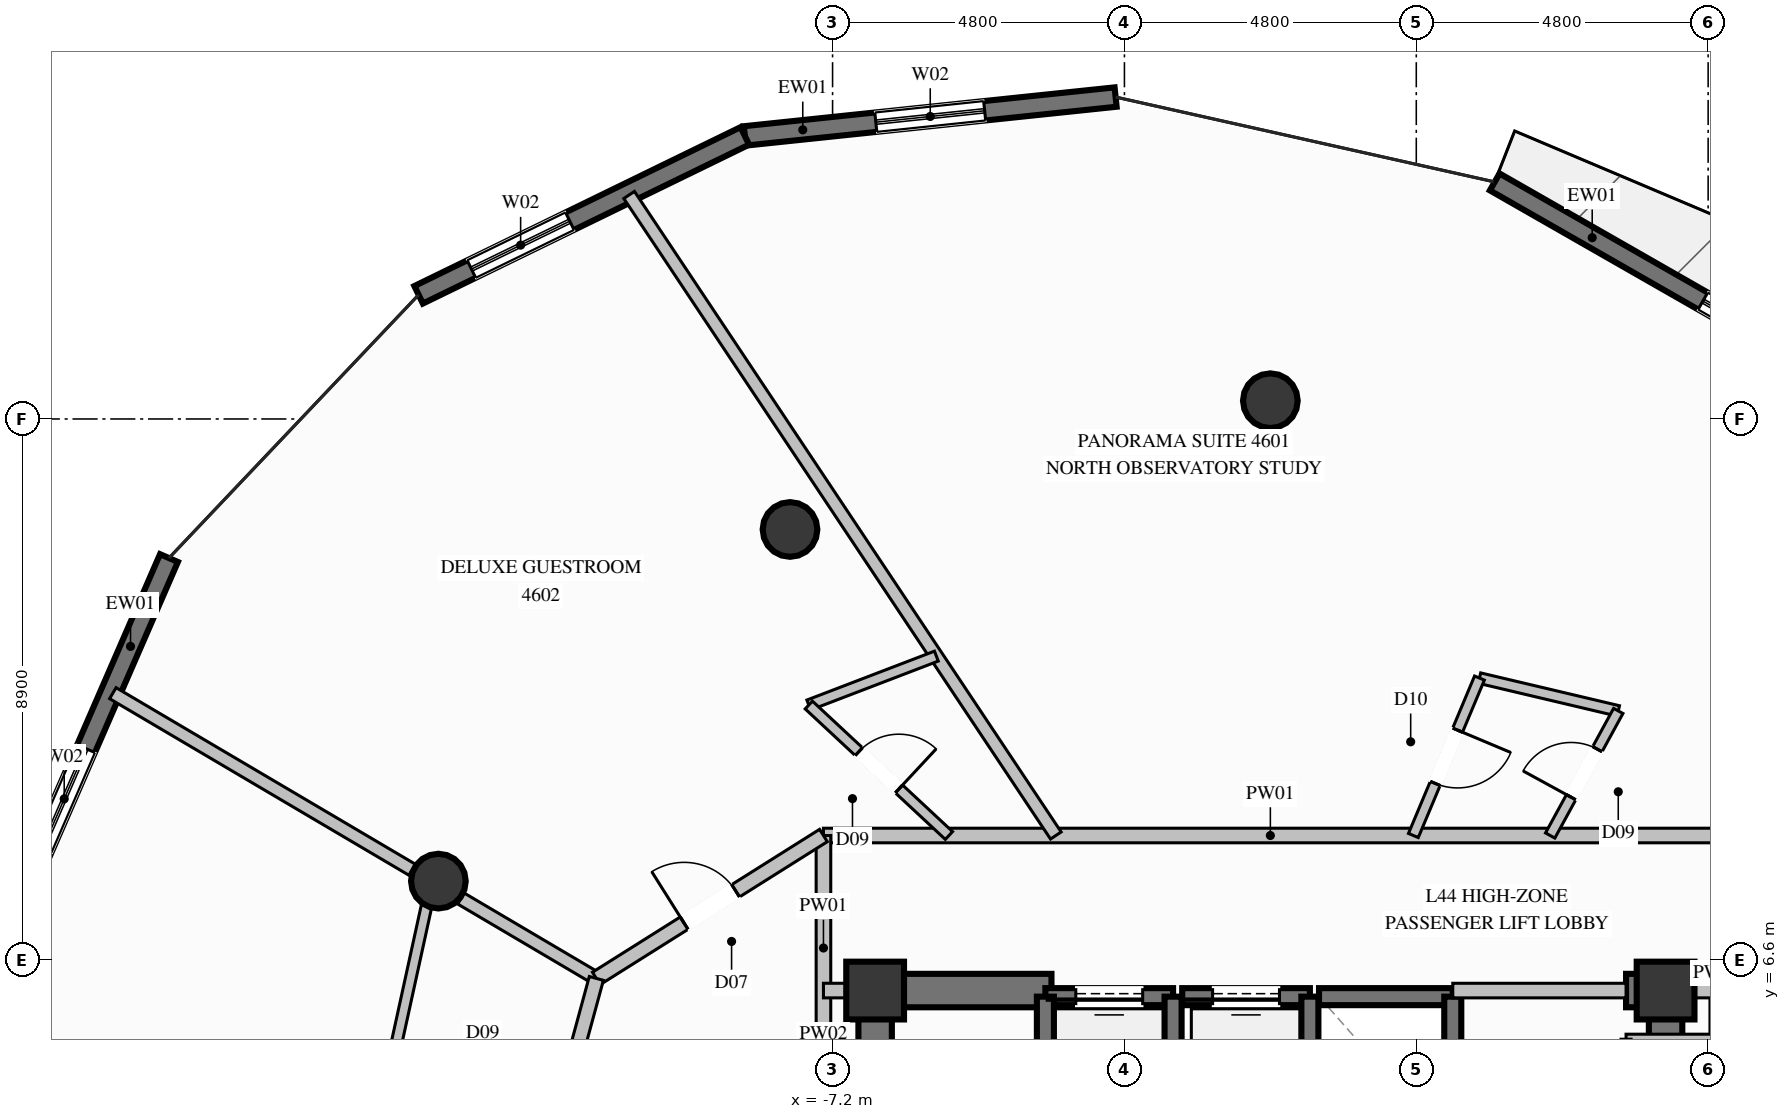
"""IFC4 building model, lengths in metres.
Left out: names, types, materials, properties, quantities, classifications, styles, units other than length and angle.
Written with IfcOpenShell. Run it as: python <this file> out.ifc"""

import sys

from ifc_helpers import new_model, si_unit, direction, frame, frame_2d, origin, origin_2d, place, context, subcontext, project, spatial, rectangle, circle, extrude, element, fill, save


model = new_model("IFC4")
c1 = context("Model", 3, precision=1e-05, world=origin(), true_north=direction((0.0, 1.0)))
c2 = subcontext(c1, "Body", "Model", "MODEL_VIEW")
j1 = project(units=[si_unit("LENGTHUNIT", "METRE"), si_unit("PLANEANGLEUNIT", "RADIAN")], contexts=[c1])
p1 = place(None, origin())
s1 = spatial("IfcSite", under=j1, at=p1, CompositionType="ELEMENT")
p2 = place(p1, origin())
s2 = spatial("IfcBuilding", under=s1, at=p2, CompositionType="ELEMENT")
p3 = place(p2, frame((0.0, 0.0, 173.2)))
s3 = spatial("IfcBuildingStorey", under=s2, at=p3, CompositionType="ELEMENT", Elevation=173.2)
for number, where, z_axis, x_axis in (
    (1, (6.5, 6.1, 0.0), (0.0, 0.0, 1.0), (1.0, 0.0, 0.0)),
    (2, (-6.5, 6.1, 0.0), (0.0, 0.0, 1.0), (1.0, 0.0, 0.0)),
):
    element("IfcColumn", number, at=place(p3, frame(where, z_axis=z_axis, x_axis=x_axis)), inside=s3, PredefinedType="COLUMN", context=c2, shape_type="SweptSolid", body=[
        extrude(rectangle(XDim=0.95, YDim=0.95, at=origin_2d()), origin(), (0.0, 0.0, 1.0), 3.6),
    ])
p4 = place(p3, frame((-6.225, 6.1, 0.0), z_axis=(0.0, 0.0, 1.0), x_axis=(1.0, 0.0, 0.0)))
e3 = element("IfcWall", 3, at=p4, inside=s3, PredefinedType="SHEAR", context=c2, shape_type="SweptSolid", body=[
    extrude(rectangle(XDim=2.625, YDim=0.55, at=frame_2d((1.312, 0.0))), origin(), (0.0, 0.0, 1.0), 3.6),
])
p5 = place(p3, frame((5.85, 6.1, 0.0), z_axis=(0.0, 0.0, 1.0), x_axis=(1.0, 0.0, 0.0)))
e4 = element("IfcWall", 4, at=p5, inside=s3, PredefinedType="SHEAR", context=c2, shape_type="SweptSolid", body=[
    extrude(rectangle(XDim=0.375, YDim=0.55, at=frame_2d((0.188, 0.0))), origin(), (0.0, 0.0, 1.0), 3.6),
])
p6 = place(p3, frame((-6.5, 2.35, 0.0), z_axis=(0.0, 0.0, 1.0), x_axis=(0.0, 1.0, 0.0)))
e5 = element("IfcWall", 5, at=p6, inside=s3, PredefinedType="SHEAR", context=c2, shape_type="SweptSolid", body=[
    extrude(rectangle(XDim=4.025, YDim=0.55, at=frame_2d((2.012, 0.0))), origin(), (0.0, 0.0, 1.0), 3.6),
])
p7 = place(p3, frame((6.5, 3.35, 0.0), z_axis=(0.0, 0.0, 1.0), x_axis=(0.0, 1.0, 0.0)))
e6 = element("IfcWall", 6, at=p7, inside=s3, PredefinedType="SHEAR", context=c2, shape_type="SweptSolid", body=[
    extrude(rectangle(XDim=3.025, YDim=0.55, at=frame_2d((1.512, 0.0))), origin(), (0.0, 0.0, 1.0), 3.6),
])
for number, where, z_axis, x_axis in (
    (7, (0.0, 15.8, 0.0), (0.0, 0.0, 1.0), (1.0, 0.0, 0.0)),
    (8, (-7.9, 13.683, 0.0), (0.0, 0.0, 1.0), (1.0, 0.0, 0.0)),
    (9, (-13.683, 7.9, 0.0), (0.0, 0.0, 1.0), (1.0, 0.0, 0.0)),
):
    element("IfcColumn", number, at=place(p3, frame(where, z_axis=z_axis, x_axis=x_axis)), inside=s3, PredefinedType="COLUMN", context=c2, shape_type="SweptSolid", body=[
        extrude(circle(Radius=0.45, at=origin_2d()), origin(), (0.0, 0.0, 1.0), 3.6),
    ])
p8 = place(p3, frame((3.69, 19.398, 0.0), z_axis=(0.0, 0.0, 1.0), x_axis=(0.868052920032, -0.496471678974, 0.0)))
e10 = element("IfcWall", 10, at=p8, inside=s3, PredefinedType="SOLIDWALL", context=c2, shape_type="SweptSolid", body=[
    extrude(rectangle(XDim=6.637, YDim=0.32, at=frame_2d((3.318, 0.0))), origin(), (0.0, 0.0, 1.0), 3.36),
])
p9 = place(p8, frame((3.944, 0.0, 0.35)))
e11 = element("IfcOpeningElement", 11, at=p9, cuts=e10, PredefinedType="OPENING", context=c2, shape_type="SweptSolid", body=[
    extrude(rectangle(XDim=1.8, YDim=2.6, at=frame_2d((0.9, 1.3))), frame((0.0, 0.17, 0.0), z_axis=(0.0, -1.0, 0.0), x_axis=(1.0, 0.0, 0.0)), (0.0, 0.0, 1.0), 0.34),
])
p10 = place(p3, frame((-8.643, 20.155, 0.0), z_axis=(0.0, 0.0, 1.0), x_axis=(0.994556170884, 0.104201837585, 0.0)))
e12 = element("IfcWall", 12, at=p10, inside=s3, PredefinedType="SOLIDWALL", context=c2, shape_type="SweptSolid", body=[
    extrude(rectangle(XDim=6.132, YDim=0.32, at=frame_2d((3.066, 0.0))), origin(), (0.0, 0.0, 1.0), 3.36),
])
p11 = place(p10, frame((2.166, 0.0, 0.35)))
e13 = element("IfcOpeningElement", 13, at=p11, cuts=e12, PredefinedType="OPENING", context=c2, shape_type="SweptSolid", body=[
    extrude(rectangle(XDim=1.8, YDim=2.6, at=frame_2d((0.9, 1.3))), frame((0.0, 0.17, 0.0), z_axis=(0.0, -1.0, 0.0), x_axis=(1.0, 0.0, 0.0)), (0.0, 0.0, 1.0), 0.34),
])
p12 = place(p3, frame((-14.008, 17.542, 0.0), z_axis=(0.0, 0.0, 1.0), x_axis=(0.899034471399, 0.437877858811, 0.0)))
e14 = element("IfcWall", 14, at=p12, inside=s3, PredefinedType="SOLIDWALL", context=c2, shape_type="SweptSolid", body=[
    extrude(rectangle(XDim=5.968, YDim=0.32, at=frame_2d((2.984, 0.0))), origin(), (0.0, 0.0, 1.0), 3.36),
])
p13 = place(p12, frame((0.966, 0.0, 0.35)))
e15 = element("IfcOpeningElement", 15, at=p13, cuts=e14, PredefinedType="OPENING", context=c2, shape_type="SweptSolid", body=[
    extrude(rectangle(XDim=1.8, YDim=2.6, at=frame_2d((0.9, 1.3))), frame((0.0, 0.17, 0.0), z_axis=(0.0, -1.0, 0.0), x_axis=(1.0, 0.0, 0.0)), (0.0, 0.0, 1.0), 0.34),
])
p14 = place(p3, frame((-20.56, 7.59, 0.0), z_axis=(0.0, 0.0, 1.0), x_axis=(0.398911001453, 0.916989647117, 0.0)))
e16 = element("IfcWall", 16, at=p14, inside=s3, PredefinedType="SOLIDWALL", context=c2, shape_type="SweptSolid", body=[
    extrude(rectangle(XDim=6.132, YDim=0.32, at=frame_2d((3.066, 0.0))), origin(), (0.0, 0.0, 1.0), 3.36),
])
p15 = place(p14, frame((0.913, 0.0, 0.35)))
e17 = element("IfcOpeningElement", 17, at=p15, cuts=e16, PredefinedType="OPENING", context=c2, shape_type="SweptSolid", body=[
    extrude(rectangle(XDim=1.8, YDim=2.6, at=frame_2d((0.9, 1.3))), frame((0.0, 0.17, 0.0), z_axis=(0.0, -1.0, 0.0), x_axis=(1.0, 0.0, 0.0)), (0.0, 0.0, 1.0), 0.34),
])
p16 = place(p3, frame((-1.6, 6.0, 0.0), z_axis=(0.0, 0.0, 1.0), x_axis=(-1.0, 0.0, 0.0)))
e18 = element("IfcWall", 18, at=p16, inside=s3, PredefinedType="SOLIDWALL", context=c2, shape_type="SweptSolid", body=[
    extrude(rectangle(XDim=2.1, YDim=0.28, at=frame_2d((1.05, 0.0))), origin(), (0.0, 0.0, 1.0), 3.36),
])
p17 = place(p16, frame((0.5, 0.0, 0.0)))
e19 = element("IfcOpeningElement", 19, at=p17, cuts=e18, PredefinedType="OPENING", context=c2, shape_type="SweptSolid", body=[
    extrude(rectangle(XDim=1.1, YDim=2.2, at=frame_2d((0.55, 1.1))), frame((0.0, 0.15, 0.0), z_axis=(0.0, -1.0, 0.0), x_axis=(1.0, 0.0, 0.0)), (0.0, 0.0, 1.0), 0.3),
])
for number, where, z_axis, x_axis in (
    (20, (-3.7, 6.0, 0.0), (0.0, 0.0, 1.0), (0.0, -1.0, 0.0)),
    (21, (-1.6, 3.5, 0.0), (0.0, 0.0, 1.0), (0.0, 1.0, 0.0)),
):
    element("IfcWall", number, at=place(p3, frame(where, z_axis=z_axis, x_axis=x_axis)), inside=s3, PredefinedType="SOLIDWALL", context=c2, shape_type="SweptSolid", body=[
        extrude(rectangle(XDim=2.5, YDim=0.28, at=frame_2d((1.25, 0.0))), origin(), (0.0, 0.0, 1.0), 3.36),
    ])
p18 = place(p3, frame((0.65, 6.0, 0.0), z_axis=(0.0, 0.0, 1.0), x_axis=(-1.0, 0.0, 0.0)))
e22 = element("IfcWall", 22, at=p18, inside=s3, PredefinedType="SOLIDWALL", context=c2, shape_type="SweptSolid", body=[
    extrude(rectangle(XDim=2.1, YDim=0.28, at=frame_2d((1.05, 0.0))), origin(), (0.0, 0.0, 1.0), 3.36),
])
p19 = place(p18, frame((0.5, 0.0, 0.0)))
e23 = element("IfcOpeningElement", 23, at=p19, cuts=e22, PredefinedType="OPENING", context=c2, shape_type="SweptSolid", body=[
    extrude(rectangle(XDim=1.1, YDim=2.2, at=frame_2d((0.55, 1.1))), frame((0.0, 0.15, 0.0), z_axis=(0.0, -1.0, 0.0), x_axis=(1.0, 0.0, 0.0)), (0.0, 0.0, 1.0), 0.3),
])
p20 = place(p3, frame((0.65, 3.5, 0.0), z_axis=(0.0, 0.0, 1.0), x_axis=(0.0, 1.0, 0.0)))
e24 = element("IfcWall", 24, at=p20, inside=s3, PredefinedType="SOLIDWALL", context=c2, shape_type="SweptSolid", body=[
    extrude(rectangle(XDim=2.5, YDim=0.28, at=frame_2d((1.25, 0.0))), origin(), (0.0, 0.0, 1.0), 3.36),
])
p21 = place(p3, frame((3.0, 6.0, 0.0), z_axis=(0.0, 0.0, 1.0), x_axis=(-1.0, 0.0, 0.0)))
e25 = element("IfcWall", 25, at=p21, inside=s3, PredefinedType="SOLIDWALL", context=c2, shape_type="SweptSolid", body=[
    extrude(rectangle(XDim=2.2, YDim=0.28, at=frame_2d((1.1, 0.0))), origin(), (0.0, 0.0, 1.0), 3.36),
])
p22 = place(p3, frame((3.0, 3.5, 0.0), z_axis=(0.0, 0.0, 1.0), x_axis=(0.0, 1.0, 0.0)))
e26 = element("IfcWall", 26, at=p22, inside=s3, PredefinedType="SOLIDWALL", context=c2, shape_type="SweptSolid", body=[
    extrude(rectangle(XDim=2.5, YDim=0.28, at=frame_2d((1.25, 0.0))), origin(), (0.0, 0.0, 1.0), 3.36),
])
p23 = place(p3, frame((-7.35, 8.65, 0.0), z_axis=(0.0, 0.0, 1.0), x_axis=(1.0, 0.0, 0.0)))
e27 = element("IfcWall", 27, at=p23, inside=s3, PredefinedType="PARTITIONING", context=c2, shape_type="SweptSolid", body=[
    extrude(rectangle(XDim=14.7, YDim=0.24, at=frame_2d((7.35, 0.0))), origin(), (0.0, 0.0, 1.0), 3.36),
])
p24 = place(p3, frame((3.0, 6.1, 0.0), z_axis=(0.0, 0.0, 1.0), x_axis=(1.0, 0.0, 0.0)))
e28 = element("IfcWall", 28, at=p24, inside=s3, PredefinedType="PARTITIONING", context=c2, shape_type="SweptSolid", body=[
    extrude(rectangle(XDim=2.85, YDim=0.24, at=frame_2d((1.425, 0.0))), origin(), (0.0, 0.0, 1.0), 2.445),
])
p25 = place(p3, frame((7.35, 5.3, 0.0), z_axis=(0.0, 0.0, 1.0), x_axis=(0.0, 1.0, 0.0)))
e29 = element("IfcWall", 29, at=p25, inside=s3, PredefinedType="PARTITIONING", context=c2, shape_type="SweptSolid", body=[
    extrude(rectangle(XDim=0.8, YDim=0.24, at=frame_2d((0.4, 0.0))), origin(), (0.0, 0.0, 1.0), 2.445),
])
p26 = place(p3, frame((6.5, 6.1, 0.0), z_axis=(0.0, 0.0, 1.0), x_axis=(1.0, 0.0, 0.0)))
e30 = element("IfcWall", 30, at=p26, inside=s3, PredefinedType="PARTITIONING", context=c2, shape_type="SweptSolid", body=[
    extrude(rectangle(XDim=0.85, YDim=0.24, at=frame_2d((0.425, 0.0))), origin(), (0.0, 0.0, 1.0), 2.801),
])
p27 = place(p3, frame((-7.35, 4.95, 0.0), z_axis=(0.0, 0.0, 1.0), x_axis=(0.0, 1.0, 0.0)))
e31 = element("IfcWall", 31, at=p27, inside=s3, PredefinedType="PARTITIONING", context=c2, shape_type="SweptSolid", body=[
    extrude(rectangle(XDim=3.7, YDim=0.24, at=frame_2d((1.85, 0.0))), origin(), (0.0, 0.0, 1.0), 2.445),
])
p28 = place(p3, frame((-7.35, 6.1, 0.0), z_axis=(0.0, 0.0, 1.0), x_axis=(1.0, 0.0, 0.0)))
e32 = element("IfcWall", 32, at=p28, inside=s3, PredefinedType="PARTITIONING", context=c2, shape_type="SweptSolid", body=[
    extrude(rectangle(XDim=0.85, YDim=0.24, at=frame_2d((0.425, 0.0))), origin(), (0.0, 0.0, 1.0), 2.801),
])
p29 = place(p3, frame((7.35, 5.3, 0.0), z_axis=(0.0, 0.0, 1.0), x_axis=(-1.0, 0.0, 0.0)))
e33 = element("IfcWall", 33, at=p29, inside=s3, PredefinedType="PARTITIONING", context=c2, shape_type="SweptSolid", body=[
    extrude(rectangle(XDim=1.5, YDim=0.165, at=frame_2d((0.75, 0.0))), origin(), (0.0, 0.0, 1.0), 2.445),
])
p30 = place(p3, frame((5.85, 5.3, 0.0), z_axis=(0.0, 0.0, 1.0), x_axis=(0.0, -1.0, 0.0)))
e34 = element("IfcWall", 34, at=p30, inside=s3, PredefinedType="PARTITIONING", context=c2, shape_type="SweptSolid", body=[
    extrude(rectangle(XDim=2.55, YDim=0.165, at=frame_2d((1.275, 0.0))), origin(), (0.0, 0.0, 1.0), 2.445),
])
p31 = place(p3, frame((-11.085, 6.3, 0.0), z_axis=(0.0, 0.0, 1.0), x_axis=(-0.86133622593, 0.508035339225, 0.0)))
e35 = element("IfcWall", 35, at=p31, inside=s3, PredefinedType="PARTITIONING", context=c2, shape_type="SweptSolid", body=[
    extrude(rectangle(XDim=2.584, YDim=0.21, at=frame_2d((1.292, 0.0))), origin(), (0.0, 0.0, 1.0), 2.801),
])
p32 = place(p3, frame((-14.114, 8.087, 0.0), z_axis=(0.0, 0.0, 1.0), x_axis=(-0.861313184314, 0.50807440255, 0.0)))
e36 = element("IfcWall", 36, at=p32, inside=s3, PredefinedType="PARTITIONING", context=c2, shape_type="SweptSolid", body=[
    extrude(rectangle(XDim=5.716, YDim=0.21, at=frame_2d((2.858, 0.0))), origin(), (0.0, 0.0, 1.0), 3.36),
])
p33 = place(p3, frame((3.439, 11.239, 0.0), z_axis=(0.0, 0.0, 1.0), x_axis=(0.973143510765, -0.230199277704, 0.0)))
e37 = element("IfcWall", 37, at=p33, inside=s3, PredefinedType="PLUMBINGWALL", context=c2, shape_type="SweptSolid", body=[
    extrude(rectangle(XDim=2.346, YDim=0.175, at=frame_2d((1.173, 0.0))), origin(), (0.0, 0.0, 1.0), 3.36),
])
p34 = place(p3, frame((3.439, 11.239, 0.0), z_axis=(0.0, 0.0, 1.0), x_axis=(-0.387077273479, -0.922047278807, 0.0)))
e38 = element("IfcWall", 38, at=p34, inside=s3, PredefinedType="PLUMBINGWALL", context=c2, shape_type="SweptSolid", body=[
    extrude(rectangle(XDim=2.808, YDim=0.175, at=frame_2d((1.404, 0.0))), origin(), (0.0, 0.0, 1.0), 3.36),
])
p35 = place(p34, frame((0.929, 0.0, 0.0)))
e39 = element("IfcOpeningElement", 39, at=p35, cuts=e38, PredefinedType="OPENING", context=c2, shape_type="SweptSolid", body=[
    extrude(rectangle(XDim=0.95, YDim=2.1, at=frame_2d((0.475, 1.05))), frame((0.0, 0.098, 0.0), z_axis=(0.0, -1.0, 0.0), x_axis=(1.0, 0.0, 0.0)), (0.0, 0.0, 1.0), 0.195),
])
p36 = place(p3, frame((4.602, 8.65, 0.0), z_axis=(0.0, 0.0, 1.0), x_axis=(0.479577167617, 0.877499709573, 0.0)))
e40 = element("IfcWall", 40, at=p36, inside=s3, PredefinedType="PLUMBINGWALL", context=c2, shape_type="SweptSolid", body=[
    extrude(rectangle(XDim=2.335, YDim=0.175, at=frame_2d((1.167, 0.0))), origin(), (0.0, 0.0, 1.0), 3.36),
])
p37 = place(p36, frame((0.718, 0.0, 0.0)))
e41 = element("IfcOpeningElement", 41, at=p37, cuts=e40, PredefinedType="OPENING", context=c2, shape_type="SweptSolid", body=[
    extrude(rectangle(XDim=0.9, YDim=2.1, at=frame_2d((0.45, 1.05))), frame((0.0, 0.098, 0.0), z_axis=(0.0, -1.0, 0.0), x_axis=(1.0, 0.0, 0.0)), (0.0, 0.0, 1.0), 0.195),
])
p38 = place(p3, frame((-3.528, 8.65, 0.0), z_axis=(0.0, 0.0, 1.0), x_axis=(-0.554428653403, 0.832231258898, 0.0)))
e42 = element("IfcWall", 42, at=p38, inside=s3, PredefinedType="PARTITIONING", context=c2, shape_type="SweptSolid", body=[
    extrude(rectangle(XDim=12.658, YDim=0.21, at=frame_2d((6.329, 0.0))), origin(), (0.0, 0.0, 1.0), 3.36),
])
p39 = place(p3, frame((-7.591, 10.796, 0.0), z_axis=(0.0, 0.0, 1.0), x_axis=(0.933759431782, 0.357901276273, 0.0)))
e43 = element("IfcWall", 43, at=p39, inside=s3, PredefinedType="PLUMBINGWALL", context=c2, shape_type="SweptSolid", body=[
    extrude(rectangle(XDim=2.247, YDim=0.175, at=frame_2d((1.124, 0.0))), origin(), (0.0, 0.0, 1.0), 3.36),
])
p40 = place(p3, frame((-7.591, 10.796, 0.0), z_axis=(0.0, 0.0, 1.0), x_axis=(0.731925968359, -0.681384162453, 0.0)))
e44 = element("IfcWall", 44, at=p40, inside=s3, PredefinedType="PLUMBINGWALL", context=c2, shape_type="SweptSolid", body=[
    extrude(rectangle(XDim=3.149, YDim=0.175, at=frame_2d((1.575, 0.0))), origin(), (0.0, 0.0, 1.0), 3.36),
])
p41 = place(p40, frame((1.125, 0.0, 0.0)))
e45 = element("IfcOpeningElement", 45, at=p41, cuts=e44, PredefinedType="OPENING", context=c2, shape_type="SweptSolid", body=[
    extrude(rectangle(XDim=0.9, YDim=2.1, at=frame_2d((0.45, 1.05))), frame((0.0, 0.098, 0.0), z_axis=(0.0, -1.0, 0.0), x_axis=(1.0, 0.0, 0.0)), (0.0, 0.0, 1.0), 0.195),
])
p42 = place(p3, frame((-11.085, 6.3, 0.0), z_axis=(0.0, 0.0, 1.0), x_axis=(0.846409267484, 0.532532958526, 0.0)))
e46 = element("IfcWall", 46, at=p42, inside=s3, PredefinedType="PARTITIONING", context=c2, shape_type="SweptSolid", body=[
    extrude(rectangle(XDim=4.413, YDim=0.24, at=frame_2d((2.206, 0.0))), origin(), (0.0, 0.0, 1.0), 3.36),
])
p43 = place(p42, frame((1.706, 0.0, 0.0)))
e47 = element("IfcOpeningElement", 47, at=p43, cuts=e46, PredefinedType="OPENING", context=c2, shape_type="SweptSolid", body=[
    extrude(rectangle(XDim=1.0, YDim=2.2, at=frame_2d((0.5, 1.1))), frame((0.0, 0.13, 0.0), z_axis=(0.0, -1.0, 0.0), x_axis=(1.0, 0.0, 0.0)), (0.0, 0.0, 1.0), 0.26),
])
p44 = place(p3, frame((-11.085, 6.3, 0.0), z_axis=(0.0, 0.0, 1.0), x_axis=(-0.262552356383, -0.964917747872, 0.0)))
e48 = element("IfcWall", 48, at=p44, inside=s3, PredefinedType="PARTITIONING", context=c2, shape_type="SweptSolid", body=[
    extrude(rectangle(XDim=2.742, YDim=0.24, at=frame_2d((1.371, 0.0))), origin(), (0.0, 0.0, 1.0), 3.36),
])
p45 = place(p3, frame((-13.789, 7.895, 0.0), z_axis=(0.0, 0.0, 1.0), x_axis=(-0.213829865727, -0.976870917022, 0.0)))
e49 = element("IfcWall", 49, at=p45, inside=s3, PredefinedType="PLUMBINGWALL", context=c2, shape_type="SweptSolid", body=[
    extrude(rectangle(XDim=3.395, YDim=0.175, at=frame_2d((1.697, 0.0))), origin(), (0.0, 0.0, 1.0), 2.929),
])
p46 = place(p9, origin())
e50 = element("IfcWindow", 50, at=p46, inside=s3, PartitioningType="SINGLE_PANEL", PredefinedType="WINDOW", context=c2, shape_type="SweptSolid", body=[
    extrude(rectangle(XDim=1.8, YDim=2.6, at=frame_2d((0.9, 1.3))), frame((0.0, 0.03, 0.0), z_axis=(0.0, -1.0, 0.0), x_axis=(1.0, 0.0, 0.0)), (0.0, 0.0, 1.0), 0.06),
])
fill(e11, e50)
p47 = place(p11, origin())
e51 = element("IfcWindow", 51, at=p47, inside=s3, PartitioningType="SINGLE_PANEL", PredefinedType="WINDOW", context=c2, shape_type="SweptSolid", body=[
    extrude(rectangle(XDim=1.8, YDim=2.6, at=frame_2d((0.9, 1.3))), frame((0.0, 0.03, 0.0), z_axis=(0.0, -1.0, 0.0), x_axis=(1.0, 0.0, 0.0)), (0.0, 0.0, 1.0), 0.06),
])
fill(e13, e51)
p48 = place(p13, origin())
e52 = element("IfcWindow", 52, at=p48, inside=s3, PartitioningType="SINGLE_PANEL", PredefinedType="WINDOW", context=c2, shape_type="SweptSolid", body=[
    extrude(rectangle(XDim=1.8, YDim=2.6, at=frame_2d((0.9, 1.3))), frame((0.0, 0.03, 0.0), z_axis=(0.0, -1.0, 0.0), x_axis=(1.0, 0.0, 0.0)), (0.0, 0.0, 1.0), 0.06),
])
fill(e15, e52)
p49 = place(p15, origin())
e53 = element("IfcWindow", 53, at=p49, inside=s3, PartitioningType="SINGLE_PANEL", PredefinedType="WINDOW", context=c2, shape_type="SweptSolid", body=[
    extrude(rectangle(XDim=1.8, YDim=2.6, at=frame_2d((0.9, 1.3))), frame((0.0, 0.03, 0.0), z_axis=(0.0, -1.0, 0.0), x_axis=(1.0, 0.0, 0.0)), (0.0, 0.0, 1.0), 0.06),
])
fill(e17, e53)
p50 = place(p17, origin())
e54 = element("IfcDoor", 54, at=p50, inside=s3, OperationType="SLIDING_TO_LEFT", PredefinedType="DOOR", context=c2, shape_type="SweptSolid", body=[
    extrude(rectangle(XDim=1.1, YDim=2.2, at=frame_2d((0.55, 1.1))), frame((0.0, 0.025, 0.0), z_axis=(0.0, -1.0, 0.0), x_axis=(1.0, 0.0, 0.0)), (0.0, 0.0, 1.0), 0.05),
])
fill(e19, e54)
p51 = place(p19, origin())
e55 = element("IfcDoor", 55, at=p51, inside=s3, OperationType="SLIDING_TO_LEFT", PredefinedType="DOOR", context=c2, shape_type="SweptSolid", body=[
    extrude(rectangle(XDim=1.1, YDim=2.2, at=frame_2d((0.55, 1.1))), frame((0.0, 0.025, 0.0), z_axis=(0.0, -1.0, 0.0), x_axis=(1.0, 0.0, 0.0)), (0.0, 0.0, 1.0), 0.05),
])
fill(e23, e55)
p52 = place(p37, origin())
e56 = element("IfcDoor", 56, at=p52, inside=s3, OperationType="SINGLE_SWING_LEFT", PredefinedType="DOOR", context=c2, shape_type="SweptSolid", body=[
    extrude(rectangle(XDim=0.9, YDim=2.1, at=frame_2d((0.45, 1.05))), frame((0.0, 0.025, 0.0), z_axis=(0.0, -1.0, 0.0), x_axis=(1.0, 0.0, 0.0)), (0.0, 0.0, 1.0), 0.05),
])
fill(e41, e56)
p53 = place(p35, origin())
e57 = element("IfcDoor", 57, at=p53, inside=s3, OperationType="SINGLE_SWING_LEFT", PredefinedType="DOOR", context=c2, shape_type="SweptSolid", body=[
    extrude(rectangle(XDim=0.95, YDim=2.1, at=frame_2d((0.475, 1.05))), frame((0.0, 0.025, 0.0), z_axis=(0.0, -1.0, 0.0), x_axis=(1.0, 0.0, 0.0)), (0.0, 0.0, 1.0), 0.05),
])
fill(e39, e57)
p54 = place(p41, origin())
e58 = element("IfcDoor", 58, at=p54, inside=s3, OperationType="SINGLE_SWING_RIGHT", PredefinedType="DOOR", context=c2, shape_type="SweptSolid", body=[
    extrude(rectangle(XDim=0.9, YDim=2.1, at=frame_2d((0.45, 1.05))), frame((0.0, 0.025, 0.0), z_axis=(0.0, -1.0, 0.0), x_axis=(1.0, 0.0, 0.0)), (0.0, 0.0, 1.0), 0.05),
])
fill(e45, e58)
p55 = place(p43, origin())
e59 = element("IfcDoor", 59, at=p55, inside=s3, OperationType="SINGLE_SWING_LEFT", PredefinedType="DOOR", context=c2, shape_type="SweptSolid", body=[
    extrude(rectangle(XDim=1.0, YDim=2.2, at=frame_2d((0.5, 1.1))), frame((0.0, 0.025, 0.0), z_axis=(0.0, -1.0, 0.0), x_axis=(1.0, 0.0, 0.0)), (0.0, 0.0, 1.0), 0.05),
])
fill(e47, e59)
save(model, sys.argv[1])
